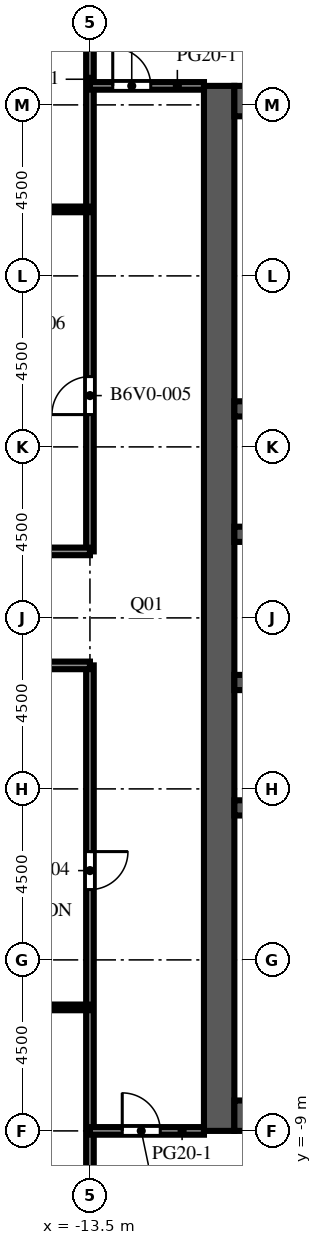
"""IFC4 building model, lengths in metres.
Left out: names, types, materials, properties, quantities, classifications, styles, units other than length and angle.
Written with IfcOpenShell. Run it as: python <this file> out.ifc"""

import sys

from ifc_helpers import new_model, si_unit, direction, frame, frame_2d, origin, place, context, subcontext, project, spatial, rectangle, extrude, element, fill, save


model = new_model("IFC4")
c1 = context("Model", 3, precision=1e-05, world=origin(), true_north=direction((0.0, 1.0)))
c2 = subcontext(c1, "Body", "Model", "MODEL_VIEW")
j1 = project(units=[si_unit("LENGTHUNIT", "METRE"), si_unit("PLANEANGLEUNIT", "RADIAN")], contexts=[c1])
p1 = place(None, origin())
s1 = spatial("IfcSite", under=j1, at=p1, CompositionType="ELEMENT")
p2 = place(p1, origin())
s2 = spatial("IfcBuilding", under=s1, at=p2, CompositionType="ELEMENT")
p3 = place(p2, frame((0.0, 0.0, 199.7)))
s3 = spatial("IfcBuildingStorey", under=s2, at=p3, CompositionType="ELEMENT", Elevation=199.7)
p4 = place(p3, frame((-10.1, -9.0, 0.0), z_axis=(0.0, 0.0, 1.0), x_axis=(0.0, 1.0, 0.0)))
e1 = element("IfcWall", 1, at=p4, inside=s3, PredefinedType="SHEAR", context=c2, shape_type="SweptSolid", body=[
    extrude(rectangle(XDim=27.5, YDim=0.8, at=frame_2d((13.75, 0.0))), origin(), (0.0, 0.0, 1.0), 4.1),
])
p5 = place(p4, frame((12.55, 0.0, 0.0)))
e2 = element("IfcOpeningElement", 2, at=p5, cuts=e1, PredefinedType="OPENING", context=c2, shape_type="SweptSolid", body=[
    extrude(rectangle(XDim=2.4, YDim=2.4, at=frame_2d((1.2, 1.2))), frame((0.0, 0.41, 0.0), z_axis=(0.0, -1.0, 0.0), x_axis=(1.0, 0.0, 0.0)), (0.0, 0.0, 1.0), 0.82),
])
p6 = place(p4, frame((6.825, 0.0, 0.0)))
e3 = element("IfcOpeningElement", 3, at=p6, cuts=e1, PredefinedType="OPENING", context=c2, shape_type="SweptSolid", body=[
    extrude(rectangle(XDim=1.2, YDim=2.1, at=frame_2d((0.6, 1.05))), frame((0.0, 0.41, 0.0), z_axis=(0.0, -1.0, 0.0), x_axis=(1.0, 0.0, 0.0)), (0.0, 0.0, 1.0), 0.82),
])
p7 = place(p4, frame((19.475, 0.0, 0.0)))
e4 = element("IfcOpeningElement", 4, at=p7, cuts=e1, PredefinedType="OPENING", context=c2, shape_type="SweptSolid", body=[
    extrude(rectangle(XDim=1.2, YDim=2.1, at=frame_2d((0.6, 1.05))), frame((0.0, 0.41, 0.0), z_axis=(0.0, -1.0, 0.0), x_axis=(1.0, 0.0, 0.0)), (0.0, 0.0, 1.0), 0.82),
])
for number, where, z_axis, x_axis in (
    (5, (-9.7, -8.6, 0.0), (0.0, 0.0, 1.0), (1.0, 0.0, 0.0)),
    (6, (-9.7, 18.1, 0.0), (0.0, 0.0, 1.0), (1.0, 0.0, 0.0)),
):
    element("IfcWall", number, at=place(p3, frame(where, z_axis=z_axis, x_axis=x_axis)), inside=s3, PredefinedType="SHEAR", context=c2, shape_type="SweptSolid", body=[
        extrude(rectangle(XDim=10.4, YDim=0.8, at=frame_2d((5.2, 0.0))), origin(), (0.0, 0.0, 1.0), 4.1),
    ])
p8 = place(p3, frame((-9.7, -0.5, 0.0), z_axis=(0.0, 0.0, 1.0), x_axis=(1.0, 0.0, 0.0)))
e7 = element("IfcWall", 7, at=p8, inside=s3, PredefinedType="SHEAR", context=c2, shape_type="SweptSolid", body=[
    extrude(rectangle(XDim=10.4, YDim=0.4, at=frame_2d((5.2, 0.0))), origin(), (0.0, 0.0, 1.0), 4.1),
])
p9 = place(p3, frame((-9.7, 2.8, 0.0), z_axis=(0.0, 0.0, 1.0), x_axis=(1.0, 0.0, 0.0)))
e8 = element("IfcWall", 8, at=p9, inside=s3, PredefinedType="SHEAR", context=c2, shape_type="SweptSolid", body=[
    extrude(rectangle(XDim=10.4, YDim=0.4, at=frame_2d((5.2, 0.0))), origin(), (0.0, 0.0, 1.0), 4.1),
])
p10 = place(p9, frame((0.738, 0.0, 0.0)))
e9 = element("IfcOpeningElement", 9, at=p10, cuts=e8, PredefinedType="OPENING", context=c2, shape_type="SweptSolid", body=[
    extrude(rectangle(XDim=1.1, YDim=2.1, at=frame_2d((0.55, 1.05))), frame((0.0, 0.21, 0.0), z_axis=(0.0, -1.0, 0.0), x_axis=(1.0, 0.0, 0.0)), (0.0, 0.0, 1.0), 0.42),
])
p11 = place(p9, frame((3.337, 0.0, 0.0)))
e10 = element("IfcOpeningElement", 10, at=p11, cuts=e8, PredefinedType="OPENING", context=c2, shape_type="SweptSolid", body=[
    extrude(rectangle(XDim=1.1, YDim=2.1, at=frame_2d((0.55, 1.05))), frame((0.0, 0.21, 0.0), z_axis=(0.0, -1.0, 0.0), x_axis=(1.0, 0.0, 0.0)), (0.0, 0.0, 1.0), 0.42),
])
p12 = place(p9, frame((6.012, 0.0, 0.0)))
e11 = element("IfcOpeningElement", 11, at=p12, cuts=e8, PredefinedType="OPENING", context=c2, shape_type="SweptSolid", body=[
    extrude(rectangle(XDim=1.0, YDim=2.1, at=frame_2d((0.5, 1.05))), frame((0.0, 0.21, 0.0), z_axis=(0.0, -1.0, 0.0), x_axis=(1.0, 0.0, 0.0)), (0.0, 0.0, 1.0), 0.42),
])
p13 = place(p9, frame((8.613, 0.0, 0.0)))
e12 = element("IfcOpeningElement", 12, at=p13, cuts=e8, PredefinedType="OPENING", context=c2, shape_type="SweptSolid", body=[
    extrude(rectangle(XDim=1.0, YDim=2.1, at=frame_2d((0.5, 1.05))), frame((0.0, 0.21, 0.0), z_axis=(0.0, -1.0, 0.0), x_axis=(1.0, 0.0, 0.0)), (0.0, 0.0, 1.0), 0.42),
])
p14 = place(p3, frame((-9.7, 6.7, 0.0), z_axis=(0.0, 0.0, 1.0), x_axis=(1.0, 0.0, 0.0)))
e13 = element("IfcWall", 13, at=p14, inside=s3, PredefinedType="SHEAR", context=c2, shape_type="SweptSolid", body=[
    extrude(rectangle(XDim=10.4, YDim=0.4, at=frame_2d((5.2, 0.0))), origin(), (0.0, 0.0, 1.0), 4.1),
])
p15 = place(p14, frame((3.337, 0.0, 0.0)))
e14 = element("IfcOpeningElement", 14, at=p15, cuts=e13, PredefinedType="OPENING", context=c2, shape_type="SweptSolid", body=[
    extrude(rectangle(XDim=1.1, YDim=2.1, at=frame_2d((0.55, 1.05))), frame((0.0, 0.21, 0.0), z_axis=(0.0, -1.0, 0.0), x_axis=(1.0, 0.0, 0.0)), (0.0, 0.0, 1.0), 0.42),
])
p16 = place(p14, frame((5.962, 0.0, 0.0)))
e15 = element("IfcOpeningElement", 15, at=p16, cuts=e13, PredefinedType="OPENING", context=c2, shape_type="SweptSolid", body=[
    extrude(rectangle(XDim=1.1, YDim=2.1, at=frame_2d((0.55, 1.05))), frame((0.0, 0.21, 0.0), z_axis=(0.0, -1.0, 0.0), x_axis=(1.0, 0.0, 0.0)), (0.0, 0.0, 1.0), 0.42),
])
p17 = place(p14, frame((8.663, 0.0, 0.0)))
e16 = element("IfcOpeningElement", 16, at=p17, cuts=e13, PredefinedType="OPENING", context=c2, shape_type="SweptSolid", body=[
    extrude(rectangle(XDim=1.1, YDim=2.1, at=frame_2d((0.55, 1.05))), frame((0.0, 0.21, 0.0), z_axis=(0.0, -1.0, 0.0), x_axis=(1.0, 0.0, 0.0)), (0.0, 0.0, 1.0), 0.42),
])
p18 = place(p14, frame((0.688, 0.0, 0.0)))
e17 = element("IfcOpeningElement", 17, at=p18, cuts=e13, PredefinedType="OPENING", context=c2, shape_type="SweptSolid", body=[
    extrude(rectangle(XDim=1.0, YDim=2.1, at=frame_2d((0.5, 1.05))), frame((0.0, 0.21, 0.0), z_axis=(0.0, -1.0, 0.0), x_axis=(1.0, 0.0, 0.0)), (0.0, 0.0, 1.0), 0.42),
])
p19 = place(p3, frame((-9.7, 10.0, 0.0), z_axis=(0.0, 0.0, 1.0), x_axis=(1.0, 0.0, 0.0)))
e18 = element("IfcWall", 18, at=p19, inside=s3, PredefinedType="SHEAR", context=c2, shape_type="SweptSolid", body=[
    extrude(rectangle(XDim=10.4, YDim=0.4, at=frame_2d((5.2, 0.0))), origin(), (0.0, 0.0, 1.0), 4.1),
])
p20 = place(p3, frame((-13.5, -26.5, 0.0), z_axis=(0.0, 0.0, 1.0), x_axis=(0.0, 1.0, 0.0)))
e19 = element("IfcWall", 19, at=p20, inside=s3, PredefinedType="PARTITIONING", context=c2, shape_type="SweptSolid", body=[
    extrude(rectangle(XDim=29.75, YDim=0.2, at=frame_2d((14.875, 0.0))), origin(), (0.0, 0.0, 1.0), 3.65),
])
p21 = place(p20, frame((23.85, 0.0, 0.0)))
e20 = element("IfcOpeningElement", 20, at=p21, cuts=e19, PredefinedType="OPENING", context=c2, shape_type="SweptSolid", body=[
    extrude(rectangle(XDim=1.0, YDim=2.1, at=frame_2d((0.5, 1.05))), frame((0.0, 0.11, 0.0), z_axis=(0.0, -1.0, 0.0), x_axis=(1.0, 0.0, 0.0)), (0.0, 0.0, 1.0), 0.22),
])
p22 = place(p3, frame((-13.5, 6.25, 0.0), z_axis=(0.0, 0.0, 1.0), x_axis=(0.0, 1.0, 0.0)))
e21 = element("IfcWall", 21, at=p22, inside=s3, PredefinedType="PARTITIONING", context=c2, shape_type="SweptSolid", body=[
    extrude(rectangle(XDim=20.25, YDim=0.2, at=frame_2d((10.125, 0.0))), origin(), (0.0, 0.0, 1.0), 3.65),
])
p23 = place(p22, frame((3.6, 0.0, 0.0)))
e22 = element("IfcOpeningElement", 22, at=p23, cuts=e21, PredefinedType="OPENING", context=c2, shape_type="SweptSolid", body=[
    extrude(rectangle(XDim=1.0, YDim=2.1, at=frame_2d((0.5, 1.05))), frame((0.0, 0.11, 0.0), z_axis=(0.0, -1.0, 0.0), x_axis=(1.0, 0.0, 0.0)), (0.0, 0.0, 1.0), 0.22),
])
p24 = place(p3, frame((-10.5, -9.0, 0.0), z_axis=(0.0, 0.0, 1.0), x_axis=(-1.0, 0.0, 0.0)))
e23 = element("IfcWall", 23, at=p24, inside=s3, PredefinedType="PARTITIONING", context=c2, shape_type="SweptSolid", body=[
    extrude(rectangle(XDim=3.0, YDim=0.2, at=frame_2d((1.5, 0.0))), origin(), (0.0, 0.0, 1.0), 3.65),
])
p25 = place(p24, frame((1.15, 0.0, 0.0)))
e24 = element("IfcOpeningElement", 24, at=p25, cuts=e23, PredefinedType="OPENING", context=c2, shape_type="SweptSolid", body=[
    extrude(rectangle(XDim=1.0, YDim=2.1, at=frame_2d((0.5, 1.05))), frame((0.0, 0.11, 0.0), z_axis=(0.0, -1.0, 0.0), x_axis=(1.0, 0.0, 0.0)), (0.0, 0.0, 1.0), 0.22),
])
p26 = place(p3, frame((-13.5, -5.75, 0.0), z_axis=(0.0, 0.0, 1.0), x_axis=(-1.0, 0.0, 0.0)))
e25 = element("IfcWall", 25, at=p26, inside=s3, PredefinedType="PARTITIONING", context=c2, shape_type="SweptSolid", body=[
    extrude(rectangle(XDim=8.85, YDim=0.15, at=frame_2d((4.425, 0.0))), origin(), (0.0, 0.0, 1.0), 3.65),
])
p27 = place(p26, frame((4.65, 0.0, 0.0)))
e26 = element("IfcOpeningElement", 26, at=p27, cuts=e25, PredefinedType="OPENING", context=c2, shape_type="SweptSolid", body=[
    extrude(rectangle(XDim=1.0, YDim=2.1, at=frame_2d((0.5, 1.05))), frame((0.0, 0.085, 0.0), z_axis=(0.0, -1.0, 0.0), x_axis=(1.0, 0.0, 0.0)), (0.0, 0.0, 1.0), 0.17),
])
for number, where, z_axis, x_axis in (
    (27, (-22.35, 3.25, 0.0), (0.0, 0.0, 1.0), (1.0, 0.0, 0.0)),
    (28, (-22.35, 6.25, 0.0), (0.0, 0.0, 1.0), (1.0, 0.0, 0.0)),
):
    element("IfcWall", number, at=place(p3, frame(where, z_axis=z_axis, x_axis=x_axis)), inside=s3, PredefinedType="PARTITIONING", context=c2, shape_type="SweptSolid", body=[
        extrude(rectangle(XDim=8.85, YDim=0.2, at=frame_2d((4.425, 0.0))), origin(), (0.0, 0.0, 1.0), 3.65),
    ])
p28 = place(p3, frame((-22.35, 15.25, 0.0), z_axis=(0.0, 0.0, 1.0), x_axis=(1.0, 0.0, 0.0)))
e29 = element("IfcWall", 29, at=p28, inside=s3, PredefinedType="PARTITIONING", context=c2, shape_type="SweptSolid", body=[
    extrude(rectangle(XDim=8.85, YDim=0.15, at=frame_2d((4.425, 0.0))), origin(), (0.0, 0.0, 1.0), 3.65),
])
p29 = place(p28, frame((4.7, 0.0, 0.0)))
e30 = element("IfcOpeningElement", 30, at=p29, cuts=e29, PredefinedType="OPENING", context=c2, shape_type="SweptSolid", body=[
    extrude(rectangle(XDim=1.0, YDim=2.1, at=frame_2d((0.5, 1.05))), frame((0.0, 0.085, 0.0), z_axis=(0.0, -1.0, 0.0), x_axis=(1.0, 0.0, 0.0)), (0.0, 0.0, 1.0), 0.17),
])
p30 = place(p3, frame((-13.5, 18.5, 0.0), z_axis=(0.0, 0.0, 1.0), x_axis=(1.0, 0.0, 0.0)))
e31 = element("IfcWall", 31, at=p30, inside=s3, PredefinedType="PARTITIONING", context=c2, shape_type="SweptSolid", body=[
    extrude(rectangle(XDim=3.0, YDim=0.2, at=frame_2d((1.5, 0.0))), origin(), (0.0, 0.0, 1.0), 3.65),
])
p31 = place(p30, frame((0.6, 0.0, 0.0)))
e32 = element("IfcOpeningElement", 32, at=p31, cuts=e31, PredefinedType="OPENING", context=c2, shape_type="SweptSolid", body=[
    extrude(rectangle(XDim=1.0, YDim=2.1, at=frame_2d((0.5, 1.05))), frame((0.0, 0.11, 0.0), z_axis=(0.0, -1.0, 0.0), x_axis=(1.0, 0.0, 0.0)), (0.0, 0.0, 1.0), 0.22),
])
p32 = place(p5, origin())
e33 = element("IfcDoor", 33, at=p32, inside=s3, OperationType="DOUBLE_DOOR_DOUBLE_SWING", PredefinedType="DOOR", context=c2, shape_type="SweptSolid", body=[
    extrude(rectangle(XDim=2.4, YDim=2.4, at=frame_2d((1.2, 1.2))), frame((0.0, 0.025, 0.0), z_axis=(0.0, -1.0, 0.0), x_axis=(1.0, 0.0, 0.0)), (0.0, 0.0, 1.0), 0.05),
])
fill(e2, e33)
p33 = place(p6, origin())
e34 = element("IfcDoor", 34, at=p33, inside=s3, OperationType="SINGLE_SWING_LEFT", PredefinedType="DOOR", context=c2, shape_type="SweptSolid", body=[
    extrude(rectangle(XDim=1.2, YDim=2.1, at=frame_2d((0.6, 1.05))), frame((0.0, 0.025, 0.0), z_axis=(0.0, -1.0, 0.0), x_axis=(1.0, 0.0, 0.0)), (0.0, 0.0, 1.0), 0.05),
])
fill(e3, e34)
p34 = place(p7, origin())
e35 = element("IfcDoor", 35, at=p34, inside=s3, OperationType="SINGLE_SWING_LEFT", PredefinedType="DOOR", context=c2, shape_type="SweptSolid", body=[
    extrude(rectangle(XDim=1.2, YDim=2.1, at=frame_2d((0.6, 1.05))), frame((0.0, 0.025, 0.0), z_axis=(0.0, -1.0, 0.0), x_axis=(1.0, 0.0, 0.0)), (0.0, 0.0, 1.0), 0.05),
])
fill(e4, e35)
p35 = place(p21, origin())
e36 = element("IfcDoor", 36, at=p35, inside=s3, OperationType="SINGLE_SWING_RIGHT", PredefinedType="DOOR", context=c2, shape_type="SweptSolid", body=[
    extrude(rectangle(XDim=1.0, YDim=2.1, at=frame_2d((0.5, 1.05))), frame((0.0, 0.025, 0.0), z_axis=(0.0, -1.0, 0.0), x_axis=(1.0, 0.0, 0.0)), (0.0, 0.0, 1.0), 0.05),
])
fill(e20, e36)
p36 = place(p23, origin())
e37 = element("IfcDoor", 37, at=p36, inside=s3, OperationType="SINGLE_SWING_LEFT", PredefinedType="DOOR", context=c2, shape_type="SweptSolid", body=[
    extrude(rectangle(XDim=1.0, YDim=2.1, at=frame_2d((0.5, 1.05))), frame((0.0, 0.025, 0.0), z_axis=(0.0, -1.0, 0.0), x_axis=(1.0, 0.0, 0.0)), (0.0, 0.0, 1.0), 0.05),
])
fill(e22, e37)
p37 = place(p25, origin())
e38 = element("IfcDoor", 38, at=p37, inside=s3, OperationType="SINGLE_SWING_RIGHT", PredefinedType="DOOR", context=c2, shape_type="SweptSolid", body=[
    extrude(rectangle(XDim=1.0, YDim=2.1, at=frame_2d((0.5, 1.05))), frame((0.0, 0.025, 0.0), z_axis=(0.0, -1.0, 0.0), x_axis=(1.0, 0.0, 0.0)), (0.0, 0.0, 1.0), 0.05),
])
fill(e24, e38)
p38 = place(p31, origin())
e39 = element("IfcDoor", 39, at=p38, inside=s3, OperationType="SINGLE_SWING_LEFT", PredefinedType="DOOR", context=c2, shape_type="SweptSolid", body=[
    extrude(rectangle(XDim=1.0, YDim=2.1, at=frame_2d((0.5, 1.05))), frame((0.0, 0.025, 0.0), z_axis=(0.0, -1.0, 0.0), x_axis=(1.0, 0.0, 0.0)), (0.0, 0.0, 1.0), 0.05),
])
fill(e32, e39)
save(model, sys.argv[1])
